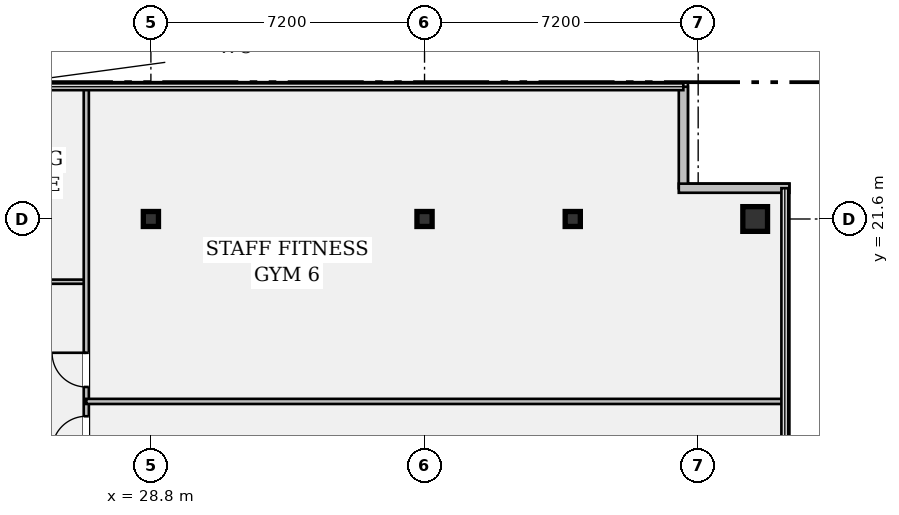
"""IFC4 building model, lengths in metres.
Left out: names, types, materials, properties, quantities, classifications, styles, units other than length and angle.
Written with IfcOpenShell. Run it as: python <this file> out.ifc"""

import sys

from ifc_helpers import new_model, si_unit, direction, frame, frame_2d, origin, origin_2d, place, context, subcontext, project, spatial, rectangle, hollow_rectangle, i_section, extrude, element, fill, save


model = new_model("IFC4")
c1 = context("Model", 3, precision=1e-05, world=origin(), true_north=direction((0.0, 1.0)))
c2 = subcontext(c1, "Body", "Model", "MODEL_VIEW")
j1 = project(units=[si_unit("LENGTHUNIT", "METRE"), si_unit("PLANEANGLEUNIT", "RADIAN")], contexts=[c1])
p1 = place(None, origin())
s1 = spatial("IfcSite", under=j1, at=p1, CompositionType="ELEMENT")
p2 = place(p1, origin())
s2 = spatial("IfcBuilding", under=s1, at=p2, CompositionType="ELEMENT")
p3 = place(p2, frame((0.0, 0.0, 279.65)))
s3 = spatial("IfcBuildingStorey", under=s2, at=p3, CompositionType="ELEMENT", Elevation=279.65)
for number, where, z_axis, x_axis in (
    (1, (28.8, 21.6, 0.0), (0.0, 0.0, 1.0), (1.0, 0.0, 0.0)),
    (2, (36.0, 21.6, 0.0), (0.0, 0.0, 1.0), (1.0, 0.0, 0.0)),
    (3, (39.9, 21.6, 0.0), (0.0, 0.0, 1.0), (1.0, 0.0, 0.0)),
):
    element("IfcColumn", number, at=place(p3, frame(where, z_axis=z_axis, x_axis=x_axis)), inside=s3, PredefinedType="COLUMN", context=c2, shape_type="SweptSolid", body=[
        extrude(i_section(OverallWidth=0.399, OverallDepth=0.394, WebThickness=0.023, FlangeThickness=0.037, FilletRadius=0.018, at=origin_2d()), origin(), (0.0, 0.0, 1.0), 3.24),
    ])
p4 = place(p3, frame((44.7, 21.6, 0.0), z_axis=(0.0, 0.0, 1.0), x_axis=(1.0, 0.0, 0.0)))
e4 = element("IfcColumn", 4, at=p4, inside=s3, PredefinedType="COLUMN", context=c2, shape_type="SweptSolid", body=[
    extrude(hollow_rectangle(XDim=0.65, YDim=0.65, WallThickness=0.04, at=origin_2d()), origin(), (0.0, 0.0, 1.0), 3.24),
])
p5 = place(p3, frame((42.81, 25.08, 0.0), z_axis=(0.0, 0.0, 1.0), x_axis=(0.0, -1.0, 0.0)))
e5 = element("IfcWall", 5, at=p5, inside=s3, PredefinedType="STANDARD", context=c2, shape_type="SweptSolid", body=[
    extrude(rectangle(XDim=2.67, YDim=0.24, at=frame_2d((1.335, 0.0))), origin(), (0.0, 0.0, 1.0), 3.24),
])
p6 = place(p3, frame((42.69, 22.41, 0.0), z_axis=(0.0, 0.0, 1.0), x_axis=(1.0, 0.0, 0.0)))
e6 = element("IfcWall", 6, at=p6, inside=s3, PredefinedType="STANDARD", context=c2, shape_type="SweptSolid", body=[
    extrude(rectangle(XDim=2.91, YDim=0.24, at=frame_2d((1.455, 0.0))), origin(), (0.0, 0.0, 1.0), 3.24),
])
p7 = place(p3, frame((25.15, 19.95, 0.0), z_axis=(0.0, 0.0, 1.0), x_axis=(1.0, 0.0, 0.0)))
e7 = element("IfcWall", 7, at=p7, inside=s3, PredefinedType="PARTITIONING", context=c2, shape_type="SweptSolid", body=[
    extrude(rectangle(XDim=1.95, YDim=0.11, at=frame_2d((0.975, 0.0))), origin(), (0.0, 0.0, 1.0), 2.808),
])
p8 = place(p3, frame((27.1, 6.52, 0.0), z_axis=(0.0, 0.0, 1.0), x_axis=(0.0, 1.0, 0.0)))
e8 = element("IfcWall", 8, at=p8, inside=s3, PredefinedType="PARTITIONING", context=c2, shape_type="SweptSolid", body=[
    extrude(rectangle(XDim=18.56, YDim=0.135, at=frame_2d((9.28, 0.0))), origin(), (0.0, 0.0, 1.0), 2.676),
])
p9 = place(p8, frame((8.99, 0.0, 0.0)))
e9 = element("IfcOpeningElement", 9, at=p9, cuts=e8, PredefinedType="OPENING", context=c2, shape_type="SweptSolid", body=[
    extrude(rectangle(XDim=0.9, YDim=2.15, at=frame_2d((0.45, 1.075))), frame((0.0, 0.08, 0.0), z_axis=(0.0, -1.0, 0.0), x_axis=(1.0, 0.0, 0.0)), (0.0, 0.0, 1.0), 0.159),
])
p10 = place(p8, frame((10.66, 0.0, 0.0)))
e10 = element("IfcOpeningElement", 10, at=p10, cuts=e8, PredefinedType="OPENING", context=c2, shape_type="SweptSolid", body=[
    extrude(rectangle(XDim=0.9, YDim=2.15, at=frame_2d((0.45, 1.075))), frame((0.0, 0.08, 0.0), z_axis=(0.0, -1.0, 0.0), x_axis=(1.0, 0.0, 0.0)), (0.0, 0.0, 1.0), 0.159),
])
p11 = place(p3, frame((27.1, 16.8, 0.0), z_axis=(0.0, 0.0, 1.0), x_axis=(1.0, 0.0, 0.0)))
e11 = element("IfcWall", 11, at=p11, inside=s3, PredefinedType="PARTITIONING", context=c2, shape_type="SweptSolid", body=[
    extrude(rectangle(XDim=18.38, YDim=0.135, at=frame_2d((9.19, 0.0))), origin(), (0.0, 0.0, 1.0), 2.676),
])
p12 = place(p9, origin())
e12 = element("IfcDoor", 12, at=p12, inside=s3, OperationType="SINGLE_SWING_LEFT", PredefinedType="DOOR", context=c2, shape_type="SweptSolid", body=[
    extrude(rectangle(XDim=0.9, YDim=2.15, at=frame_2d((0.45, 1.075))), frame((0.0, 0.025, 0.0), z_axis=(0.0, -1.0, 0.0), x_axis=(1.0, 0.0, 0.0)), (0.0, 0.0, 1.0), 0.05),
])
fill(e9, e12)
p13 = place(p10, origin())
e13 = element("IfcDoor", 13, at=p13, inside=s3, OperationType="SINGLE_SWING_RIGHT", PredefinedType="DOOR", context=c2, shape_type="SweptSolid", body=[
    extrude(rectangle(XDim=0.9, YDim=2.15, at=frame_2d((0.45, 1.075))), frame((0.0, 0.025, 0.0), z_axis=(0.0, -1.0, 0.0), x_axis=(1.0, 0.0, 0.0)), (0.0, 0.0, 1.0), 0.05),
])
fill(e10, e13)
save(model, sys.argv[1])
